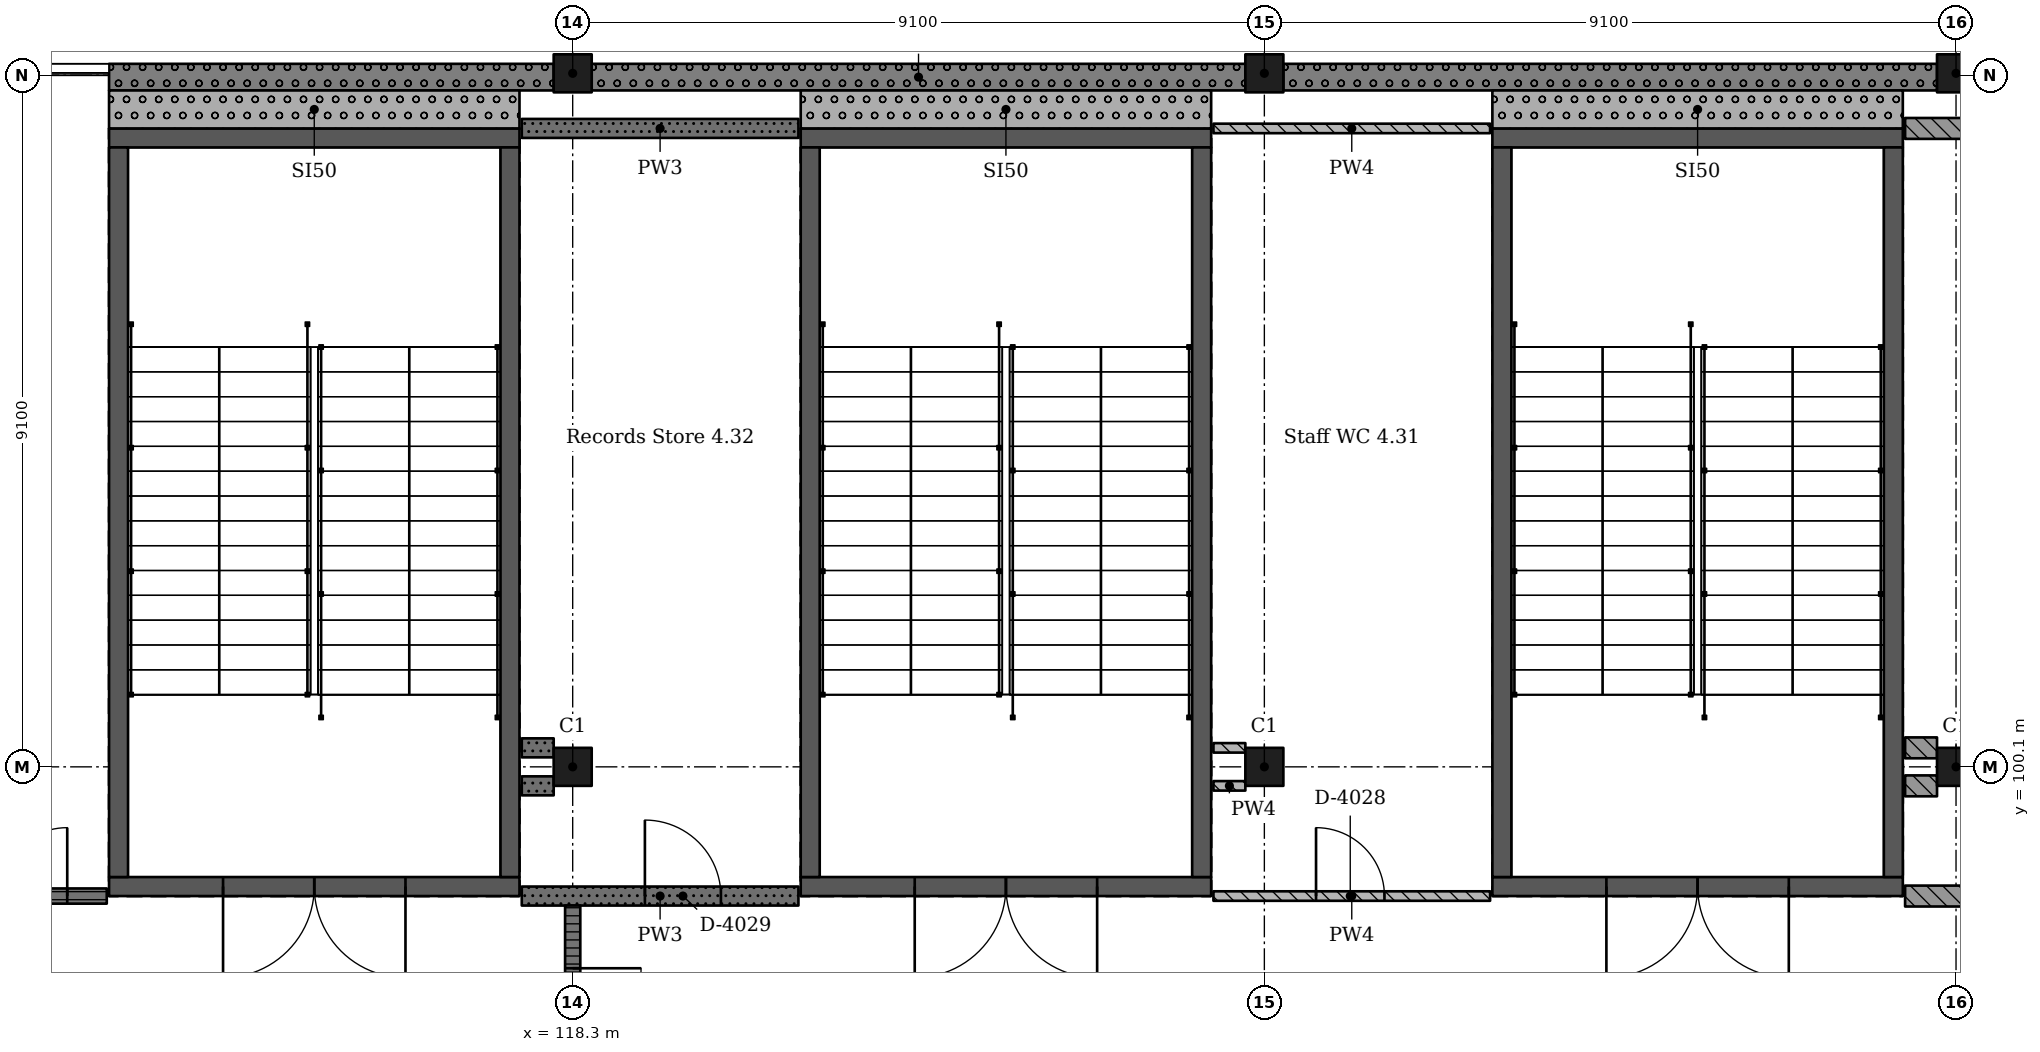
"""IFC4 building model, lengths in metres.
Left out: names, types, materials, properties, quantities, classifications, styles, units other than length and angle.
Written with IfcOpenShell. Run it as: python <this file> out.ifc"""

import sys

from ifc_helpers import new_model, si_unit, direction, frame, frame_2d, origin, origin_2d, place, context, subcontext, project, spatial, rectangle, extrude, element, fill, save


model = new_model("IFC4")
c1 = context("Model", 3, precision=1e-05, world=origin(), true_north=direction((0.0, 1.0)))
c2 = subcontext(c1, "Body", "Model", "MODEL_VIEW")
j1 = project(units=[si_unit("LENGTHUNIT", "METRE"), si_unit("PLANEANGLEUNIT", "RADIAN")], contexts=[c1])
p1 = place(None, origin())
s1 = spatial("IfcSite", under=j1, at=p1, CompositionType="ELEMENT")
p2 = place(p1, origin())
s2 = spatial("IfcBuilding", under=s1, at=p2, CompositionType="ELEMENT")
p3 = place(p2, frame((0.0, 0.0, 20.02)))
s3 = spatial("IfcBuildingStorey", under=s2, at=p3, CompositionType="ELEMENT", Elevation=20.02)
for number, where, z_axis, x_axis in (
    (1, (118.3, 100.1, 0.0), (0.0, 0.0, 1.0), (1.0, 0.0, 0.0)),
    (2, (118.3, 109.225, 0.0), (0.0, 0.0, 1.0), (1.0, 0.0, 0.0)),
    (3, (127.4, 100.1, 0.0), (0.0, 0.0, 1.0), (1.0, 0.0, 0.0)),
    (4, (127.4, 109.225, 0.0), (0.0, 0.0, 1.0), (1.0, 0.0, 0.0)),
    (5, (136.5, 100.1, 0.0), (0.0, 0.0, 1.0), (1.0, 0.0, 0.0)),
    (6, (136.5, 109.225, 0.0), (0.0, 0.0, 1.0), (1.0, 0.0, 0.0)),
):
    element("IfcColumn", number, at=place(p3, frame(where, z_axis=z_axis, x_axis=x_axis)), inside=s3, PredefinedType="COLUMN", context=c2, shape_type="SweptSolid", body=[
        extrude(rectangle(XDim=0.5, YDim=0.5, at=origin_2d()), origin(), (0.0, 0.0, 1.0), 4.55),
    ])
p4 = place(p3, frame((135.8, 98.525, 0.0), z_axis=(0.0, 0.0, 1.0), x_axis=(-1.0, 0.0, 0.0)))
e7 = element("IfcWall", 7, at=p4, inside=s3, PredefinedType="SHEAR", context=c2, shape_type="SweptSolid", body=[
    extrude(rectangle(XDim=5.4, YDim=0.25, at=frame_2d((2.7, 0.0))), origin(), (0.0, 0.0, 1.0), 4.55),
])
p5 = place(p4, frame((1.5, 0.0, 0.0)))
e8 = element("IfcOpeningElement", 8, at=p5, cuts=e7, PredefinedType="OPENING", context=c2, shape_type="SweptSolid", body=[
    extrude(rectangle(XDim=2.4, YDim=2.1, at=frame_2d((1.2, 1.05))), frame((0.0, 0.135, 0.0), z_axis=(0.0, -1.0, 0.0), x_axis=(1.0, 0.0, 0.0)), (0.0, 0.0, 1.0), 0.27),
])
p6 = place(p3, frame((135.8, 108.375, 0.0), z_axis=(0.0, 0.0, 1.0), x_axis=(-1.0, 0.0, 0.0)))
e9 = element("IfcWall", 9, at=p6, inside=s3, PredefinedType="SHEAR", context=c2, shape_type="SweptSolid", body=[
    extrude(rectangle(XDim=5.4, YDim=0.25, at=frame_2d((2.7, 0.0))), origin(), (0.0, 0.0, 1.0), 4.55),
])
for number, where, z_axis, x_axis in (
    (10, (130.525, 108.25, 0.0), (0.0, 0.0, 1.0), (0.0, -1.0, 0.0)),
    (11, (135.675, 108.25, 0.0), (0.0, 0.0, 1.0), (0.0, -1.0, 0.0)),
):
    element("IfcWall", number, at=place(p3, frame(where, z_axis=z_axis, x_axis=x_axis)), inside=s3, PredefinedType="SHEAR", context=c2, shape_type="SweptSolid", body=[
        extrude(rectangle(XDim=9.6, YDim=0.25, at=frame_2d((4.8, 0.0))), origin(), (0.0, 0.0, 1.0), 4.55),
    ])
p7 = place(p3, frame((126.7, 98.525, 0.0), z_axis=(0.0, 0.0, 1.0), x_axis=(-1.0, 0.0, 0.0)))
e12 = element("IfcWall", 12, at=p7, inside=s3, PredefinedType="SHEAR", context=c2, shape_type="SweptSolid", body=[
    extrude(rectangle(XDim=5.4, YDim=0.25, at=frame_2d((2.7, 0.0))), origin(), (0.0, 0.0, 1.0), 4.55),
])
p8 = place(p7, frame((1.5, 0.0, 0.0)))
e13 = element("IfcOpeningElement", 13, at=p8, cuts=e12, PredefinedType="OPENING", context=c2, shape_type="SweptSolid", body=[
    extrude(rectangle(XDim=2.4, YDim=2.1, at=frame_2d((1.2, 1.05))), frame((0.0, 0.135, 0.0), z_axis=(0.0, -1.0, 0.0), x_axis=(1.0, 0.0, 0.0)), (0.0, 0.0, 1.0), 0.27),
])
p9 = place(p3, frame((126.7, 108.375, 0.0), z_axis=(0.0, 0.0, 1.0), x_axis=(-1.0, 0.0, 0.0)))
e14 = element("IfcWall", 14, at=p9, inside=s3, PredefinedType="SHEAR", context=c2, shape_type="SweptSolid", body=[
    extrude(rectangle(XDim=5.4, YDim=0.25, at=frame_2d((2.7, 0.0))), origin(), (0.0, 0.0, 1.0), 4.55),
])
for number, where, z_axis, x_axis in (
    (15, (121.425, 108.25, 0.0), (0.0, 0.0, 1.0), (0.0, -1.0, 0.0)),
    (16, (126.575, 108.25, 0.0), (0.0, 0.0, 1.0), (0.0, -1.0, 0.0)),
):
    element("IfcWall", number, at=place(p3, frame(where, z_axis=z_axis, x_axis=x_axis)), inside=s3, PredefinedType="SHEAR", context=c2, shape_type="SweptSolid", body=[
        extrude(rectangle(XDim=9.6, YDim=0.25, at=frame_2d((4.8, 0.0))), origin(), (0.0, 0.0, 1.0), 4.55),
    ])
p10 = place(p3, frame((117.6, 98.525, 0.0), z_axis=(0.0, 0.0, 1.0), x_axis=(-1.0, 0.0, 0.0)))
e17 = element("IfcWall", 17, at=p10, inside=s3, PredefinedType="SHEAR", context=c2, shape_type="SweptSolid", body=[
    extrude(rectangle(XDim=5.4, YDim=0.25, at=frame_2d((2.7, 0.0))), origin(), (0.0, 0.0, 1.0), 4.55),
])
p11 = place(p10, frame((1.5, 0.0, 0.0)))
e18 = element("IfcOpeningElement", 18, at=p11, cuts=e17, PredefinedType="OPENING", context=c2, shape_type="SweptSolid", body=[
    extrude(rectangle(XDim=2.4, YDim=2.1, at=frame_2d((1.2, 1.05))), frame((0.0, 0.135, 0.0), z_axis=(0.0, -1.0, 0.0), x_axis=(1.0, 0.0, 0.0)), (0.0, 0.0, 1.0), 0.27),
])
p12 = place(p3, frame((117.6, 108.375, 0.0), z_axis=(0.0, 0.0, 1.0), x_axis=(-1.0, 0.0, 0.0)))
e19 = element("IfcWall", 19, at=p12, inside=s3, PredefinedType="SHEAR", context=c2, shape_type="SweptSolid", body=[
    extrude(rectangle(XDim=5.4, YDim=0.25, at=frame_2d((2.7, 0.0))), origin(), (0.0, 0.0, 1.0), 4.55),
])
for number, where, z_axis, x_axis in (
    (20, (112.325, 108.25, 0.0), (0.0, 0.0, 1.0), (0.0, -1.0, 0.0)),
    (21, (117.475, 108.25, 0.0), (0.0, 0.0, 1.0), (0.0, -1.0, 0.0)),
):
    element("IfcWall", number, at=place(p3, frame(where, z_axis=z_axis, x_axis=x_axis)), inside=s3, PredefinedType="SHEAR", context=c2, shape_type="SweptSolid", body=[
        extrude(rectangle(XDim=9.6, YDim=0.25, at=frame_2d((4.8, 0.0))), origin(), (0.0, 0.0, 1.0), 4.55),
    ])
p13 = place(p3, frame((136.25, 109.175, 0.0), z_axis=(0.0, 0.0, 1.0), x_axis=(-1.0, 0.0, 0.0)))
e22 = element("IfcWall", 22, at=p13, inside=s3, PredefinedType="SOLIDWALL", context=c2, shape_type="SweptSolid", body=[
    extrude(rectangle(XDim=8.6, YDim=0.35, at=frame_2d((4.3, 0.0))), origin(), (0.0, 0.0, 1.0), 3.5),
])
p14 = place(p3, frame((127.15, 109.175, 0.0), z_axis=(0.0, 0.0, 1.0), x_axis=(-1.0, 0.0, 0.0)))
e23 = element("IfcWall", 23, at=p14, inside=s3, PredefinedType="SOLIDWALL", context=c2, shape_type="SweptSolid", body=[
    extrude(rectangle(XDim=8.6, YDim=0.35, at=frame_2d((4.3, 0.0))), origin(), (0.0, 0.0, 1.0), 3.5),
])
p15 = place(p3, frame((118.05, 109.175, 0.0), z_axis=(0.0, 0.0, 1.0), x_axis=(-1.0, 0.0, 0.0)))
e24 = element("IfcWall", 24, at=p15, inside=s3, PredefinedType="SOLIDWALL", context=c2, shape_type="SweptSolid", body=[
    extrude(rectangle(XDim=5.85, YDim=0.35, at=frame_2d((2.925, 0.0))), origin(), (0.0, 0.0, 1.0), 3.5),
])
p16 = place(p3, frame((130.4, 108.75, 0.0), z_axis=(0.0, 0.0, 1.0), x_axis=(1.0, 0.0, 0.0)))
e25 = element("IfcWall", 25, at=p16, inside=s3, PredefinedType="SOLIDWALL", context=c2, shape_type="SweptSolid", body=[
    extrude(rectangle(XDim=5.4, YDim=0.5, at=frame_2d((2.7, 0.0))), origin(), (0.0, 0.0, 1.0), 4.25),
])
p17 = place(p3, frame((121.3, 108.75, 0.0), z_axis=(0.0, 0.0, 1.0), x_axis=(1.0, 0.0, 0.0)))
e26 = element("IfcWall", 26, at=p17, inside=s3, PredefinedType="SOLIDWALL", context=c2, shape_type="SweptSolid", body=[
    extrude(rectangle(XDim=5.4, YDim=0.5, at=frame_2d((2.7, 0.0))), origin(), (0.0, 0.0, 1.0), 4.25),
])
p18 = place(p3, frame((112.2, 108.75, 0.0), z_axis=(0.0, 0.0, 1.0), x_axis=(1.0, 0.0, 0.0)))
e27 = element("IfcWall", 27, at=p18, inside=s3, PredefinedType="SOLIDWALL", context=c2, shape_type="SweptSolid", body=[
    extrude(rectangle(XDim=5.4, YDim=0.5, at=frame_2d((2.7, 0.0))), origin(), (0.0, 0.0, 1.0), 4.25),
])
p19 = place(p3, frame((109.4, 98.4, 0.0), z_axis=(0.0, 0.0, 1.0), x_axis=(1.0, 0.0, 0.0)))
e28 = element("IfcWall", 28, at=p19, inside=s3, PredefinedType="PARTITIONING", context=c2, shape_type="SweptSolid", body=[
    extrude(rectangle(XDim=2.77, YDim=0.2, at=frame_2d((1.385, 0.0))), origin(), (0.0, 0.0, 1.0), 4.25),
])
p20 = place(p19, frame((0.45, 0.0, 0.0)))
e29 = element("IfcOpeningElement", 29, at=p20, cuts=e28, PredefinedType="OPENING", context=c2, shape_type="SweptSolid", body=[
    extrude(rectangle(XDim=1.8, YDim=2.4, at=frame_2d((0.9, 1.2))), frame((0.0, 0.11, 0.0), z_axis=(0.0, -1.0, 0.0), x_axis=(1.0, 0.0, 0.0)), (0.0, 0.0, 1.0), 0.22),
])
p21 = place(p3, frame((117.63, 98.4, 0.0), z_axis=(0.0, 0.0, 1.0), x_axis=(1.0, 0.0, 0.0)))
e30 = element("IfcWall", 30, at=p21, inside=s3, PredefinedType="SOLIDWALL", context=c2, shape_type="SweptSolid", body=[
    extrude(rectangle(XDim=3.64, YDim=0.25, at=frame_2d((1.82, 0.0))), origin(), (0.0, 0.0, 1.0), 4.25),
])
p22 = place(p21, frame((1.62, 0.0, 0.0)))
e31 = element("IfcOpeningElement", 31, at=p22, cuts=e30, PredefinedType="OPENING", context=c2, shape_type="SweptSolid", body=[
    extrude(rectangle(XDim=1.0, YDim=2.1, at=frame_2d((0.5, 1.05))), frame((0.0, 0.135, 0.0), z_axis=(0.0, -1.0, 0.0), x_axis=(1.0, 0.0, 0.0)), (0.0, 0.0, 1.0), 0.27),
])
p23 = place(p3, frame((117.63, 99.85, 0.0), z_axis=(0.0, 0.0, 1.0), x_axis=(1.0, 0.0, 0.0)))
e32 = element("IfcWall", 32, at=p23, inside=s3, PredefinedType="SOLIDWALL", context=c2, shape_type="SweptSolid", body=[
    extrude(rectangle(XDim=0.42, YDim=0.25, at=frame_2d((0.21, 0.0))), origin(), (0.0, 0.0, 1.0), 4.25),
])
p24 = place(p3, frame((117.63, 108.5, 0.0), z_axis=(0.0, 0.0, 1.0), x_axis=(1.0, 0.0, 0.0)))
e33 = element("IfcWall", 33, at=p24, inside=s3, PredefinedType="SOLIDWALL", context=c2, shape_type="SweptSolid", body=[
    extrude(rectangle(XDim=3.64, YDim=0.25, at=frame_2d((1.82, 0.0))), origin(), (0.0, 0.0, 1.0), 4.25),
])
p25 = place(p3, frame((118.05, 100.35, 0.0), z_axis=(0.0, 0.0, 1.0), x_axis=(-1.0, 0.0, 0.0)))
e34 = element("IfcWall", 34, at=p25, inside=s3, PredefinedType="SOLIDWALL", context=c2, shape_type="SweptSolid", body=[
    extrude(rectangle(XDim=0.42, YDim=0.25, at=frame_2d((0.21, 0.0))), origin(), (0.0, 0.0, 1.0), 4.25),
])
p26 = place(p3, frame((118.3, 91.3, 0.0), z_axis=(0.0, 0.0, 1.0), x_axis=(0.0, 1.0, 0.0)))
e35 = element("IfcWall", 35, at=p26, inside=s3, PredefinedType="PARTITIONING", context=c2, shape_type="SweptSolid", body=[
    extrude(rectangle(XDim=6.975, YDim=0.2, at=frame_2d((3.487, 0.0))), origin(), (0.0, 0.0, 1.0), 3.5),
])
p27 = place(p26, frame((0.85, 0.0, 0.0)))
e36 = element("IfcOpeningElement", 36, at=p27, cuts=e35, PredefinedType="OPENING", context=c2, shape_type="SweptSolid", body=[
    extrude(rectangle(XDim=1.8, YDim=2.4, at=frame_2d((0.9, 1.2))), frame((0.0, 0.11, 0.0), z_axis=(0.0, -1.0, 0.0), x_axis=(1.0, 0.0, 0.0)), (0.0, 0.0, 1.0), 0.22),
])
p28 = place(p26, frame((4.35, 0.0, 0.0)))
e37 = element("IfcOpeningElement", 37, at=p28, cuts=e35, PredefinedType="OPENING", context=c2, shape_type="SweptSolid", body=[
    extrude(rectangle(XDim=1.8, YDim=2.4, at=frame_2d((0.9, 1.2))), frame((0.0, 0.11, 0.0), z_axis=(0.0, -1.0, 0.0), x_axis=(1.0, 0.0, 0.0)), (0.0, 0.0, 1.0), 0.22),
])
p29 = place(p3, frame((126.73, 98.4, 0.0), z_axis=(0.0, 0.0, 1.0), x_axis=(1.0, 0.0, 0.0)))
e38 = element("IfcWall", 38, at=p29, inside=s3, PredefinedType="PARTITIONING", context=c2, shape_type="SweptSolid", body=[
    extrude(rectangle(XDim=3.64, YDim=0.125, at=frame_2d((1.82, 0.0))), origin(), (0.0, 0.0, 1.0), 4.25),
])
p30 = place(p29, frame((1.35, 0.0, 0.0)))
e39 = element("IfcOpeningElement", 39, at=p30, cuts=e38, PredefinedType="OPENING", context=c2, shape_type="SweptSolid", body=[
    extrude(rectangle(XDim=0.9, YDim=2.1, at=frame_2d((0.45, 1.05))), frame((0.0, 0.073, 0.0), z_axis=(0.0, -1.0, 0.0), x_axis=(1.0, 0.0, 0.0)), (0.0, 0.0, 1.0), 0.145),
])
p31 = place(p3, frame((126.73, 99.85, 0.0), z_axis=(0.0, 0.0, 1.0), x_axis=(1.0, 0.0, 0.0)))
e40 = element("IfcWall", 40, at=p31, inside=s3, PredefinedType="PARTITIONING", context=c2, shape_type="SweptSolid", body=[
    extrude(rectangle(XDim=0.42, YDim=0.125, at=frame_2d((0.21, 0.0))), origin(), (0.0, 0.0, 1.0), 4.25),
])
p32 = place(p3, frame((126.73, 108.5, 0.0), z_axis=(0.0, 0.0, 1.0), x_axis=(1.0, 0.0, 0.0)))
e41 = element("IfcWall", 41, at=p32, inside=s3, PredefinedType="PARTITIONING", context=c2, shape_type="SweptSolid", body=[
    extrude(rectangle(XDim=3.64, YDim=0.125, at=frame_2d((1.82, 0.0))), origin(), (0.0, 0.0, 1.0), 4.25),
])
p33 = place(p3, frame((127.15, 100.35, 0.0), z_axis=(0.0, 0.0, 1.0), x_axis=(-1.0, 0.0, 0.0)))
e42 = element("IfcWall", 42, at=p33, inside=s3, PredefinedType="PARTITIONING", context=c2, shape_type="SweptSolid", body=[
    extrude(rectangle(XDim=0.42, YDim=0.125, at=frame_2d((0.21, 0.0))), origin(), (0.0, 0.0, 1.0), 4.25),
])
p34 = place(p3, frame((135.83, 98.4, 0.0), z_axis=(0.0, 0.0, 1.0), x_axis=(1.0, 0.0, 0.0)))
e43 = element("IfcWall", 43, at=p34, inside=s3, PredefinedType="SOLIDWALL", context=c2, shape_type="SweptSolid", body=[
    extrude(rectangle(XDim=3.64, YDim=0.275, at=frame_2d((1.82, 0.0))), origin(), (0.0, 0.0, 1.0), 4.25),
])
p35 = place(p34, frame((1.25, 0.0, 0.0)))
e44 = element("IfcOpeningElement", 44, at=p35, cuts=e43, PredefinedType="OPENING", context=c2, shape_type="SweptSolid", body=[
    extrude(rectangle(XDim=1.2, YDim=2.4, at=frame_2d((0.6, 1.2))), frame((0.0, 0.147, 0.0), z_axis=(0.0, -1.0, 0.0), x_axis=(1.0, 0.0, 0.0)), (0.0, 0.0, 1.0), 0.295),
])
p36 = place(p3, frame((135.83, 99.85, 0.0), z_axis=(0.0, 0.0, 1.0), x_axis=(1.0, 0.0, 0.0)))
e45 = element("IfcWall", 45, at=p36, inside=s3, PredefinedType="SOLIDWALL", context=c2, shape_type="SweptSolid", body=[
    extrude(rectangle(XDim=0.42, YDim=0.275, at=frame_2d((0.21, 0.0))), origin(), (0.0, 0.0, 1.0), 4.25),
])
p37 = place(p3, frame((135.83, 108.5, 0.0), z_axis=(0.0, 0.0, 1.0), x_axis=(1.0, 0.0, 0.0)))
e46 = element("IfcWall", 46, at=p37, inside=s3, PredefinedType="SOLIDWALL", context=c2, shape_type="SweptSolid", body=[
    extrude(rectangle(XDim=3.64, YDim=0.275, at=frame_2d((1.82, 0.0))), origin(), (0.0, 0.0, 1.0), 4.25),
])
p38 = place(p3, frame((136.25, 100.35, 0.0), z_axis=(0.0, 0.0, 1.0), x_axis=(-1.0, 0.0, 0.0)))
e47 = element("IfcWall", 47, at=p38, inside=s3, PredefinedType="SOLIDWALL", context=c2, shape_type="SweptSolid", body=[
    extrude(rectangle(XDim=0.42, YDim=0.275, at=frame_2d((0.21, 0.0))), origin(), (0.0, 0.0, 1.0), 4.25),
])
p39 = place(p30, origin())
e48 = element("IfcDoor", 48, at=p39, inside=s3, OperationType="SINGLE_SWING_RIGHT", PredefinedType="DOOR", context=c2, shape_type="SweptSolid", body=[
    extrude(rectangle(XDim=0.9, YDim=2.1, at=frame_2d((0.45, 1.05))), frame((0.0, 0.025, 0.0), z_axis=(0.0, -1.0, 0.0), x_axis=(1.0, 0.0, 0.0)), (0.0, 0.0, 1.0), 0.05),
])
fill(e39, e48)
p40 = place(p22, origin())
e49 = element("IfcDoor", 49, at=p40, inside=s3, OperationType="SINGLE_SWING_RIGHT", PredefinedType="DOOR", context=c2, shape_type="SweptSolid", body=[
    extrude(rectangle(XDim=1.0, YDim=2.1, at=frame_2d((0.5, 1.05))), frame((0.0, 0.025, 0.0), z_axis=(0.0, -1.0, 0.0), x_axis=(1.0, 0.0, 0.0)), (0.0, 0.0, 1.0), 0.05),
])
fill(e31, e49)
p41 = place(p28, origin())
e50 = element("IfcDoor", 50, at=p41, inside=s3, OperationType="DOUBLE_DOOR_SINGLE_SWING", PredefinedType="DOOR", context=c2, shape_type="SweptSolid", body=[
    extrude(rectangle(XDim=1.8, YDim=2.4, at=frame_2d((0.9, 1.2))), frame((0.0, 0.025, 0.0), z_axis=(0.0, -1.0, 0.0), x_axis=(1.0, 0.0, 0.0)), (0.0, 0.0, 1.0), 0.05),
])
fill(e37, e50)
p42 = place(p20, origin())
e51 = element("IfcDoor", 51, at=p42, inside=s3, OperationType="DOUBLE_DOOR_SINGLE_SWING", PredefinedType="DOOR", context=c2, shape_type="SweptSolid", body=[
    extrude(rectangle(XDim=1.8, YDim=2.4, at=frame_2d((0.9, 1.2))), frame((0.0, 0.025, 0.0), z_axis=(0.0, -1.0, 0.0), x_axis=(1.0, 0.0, 0.0)), (0.0, 0.0, 1.0), 0.05),
])
fill(e29, e51)
p43 = place(p5, origin())
e52 = element("IfcDoor", 52, at=p43, inside=s3, OperationType="DOUBLE_DOOR_SINGLE_SWING", PredefinedType="DOOR", context=c2, shape_type="SweptSolid", body=[
    extrude(rectangle(XDim=2.4, YDim=2.1, at=frame_2d((1.2, 1.05))), frame((0.0, 0.025, 0.0), z_axis=(0.0, -1.0, 0.0), x_axis=(1.0, 0.0, 0.0)), (0.0, 0.0, 1.0), 0.05),
])
fill(e8, e52)
p44 = place(p8, origin())
e53 = element("IfcDoor", 53, at=p44, inside=s3, OperationType="DOUBLE_DOOR_SINGLE_SWING", PredefinedType="DOOR", context=c2, shape_type="SweptSolid", body=[
    extrude(rectangle(XDim=2.4, YDim=2.1, at=frame_2d((1.2, 1.05))), frame((0.0, 0.025, 0.0), z_axis=(0.0, -1.0, 0.0), x_axis=(1.0, 0.0, 0.0)), (0.0, 0.0, 1.0), 0.05),
])
fill(e13, e53)
p45 = place(p11, origin())
e54 = element("IfcDoor", 54, at=p45, inside=s3, OperationType="DOUBLE_DOOR_SINGLE_SWING", PredefinedType="DOOR", context=c2, shape_type="SweptSolid", body=[
    extrude(rectangle(XDim=2.4, YDim=2.1, at=frame_2d((1.2, 1.05))), frame((0.0, 0.025, 0.0), z_axis=(0.0, -1.0, 0.0), x_axis=(1.0, 0.0, 0.0)), (0.0, 0.0, 1.0), 0.05),
])
fill(e18, e54)
save(model, sys.argv[1])
